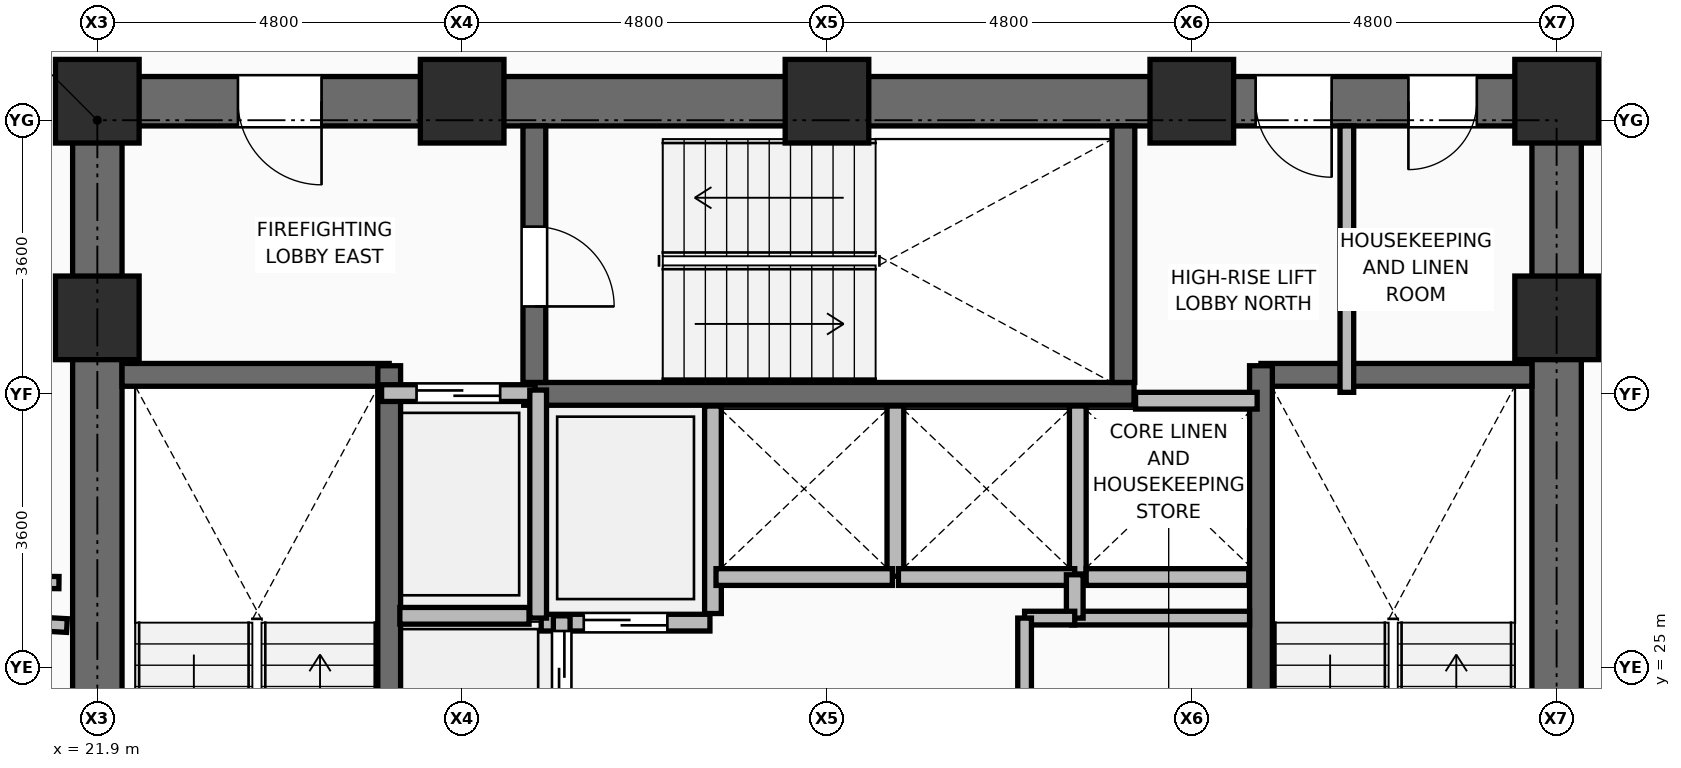
"""IFC4 building model, lengths in metres.
Left out: names, types, materials, properties, quantities, classifications, styles, units other than length and angle.
Written with IfcOpenShell. Run it as: python <this file> out.ifc"""

import sys

from ifc_helpers import new_model, si_unit, direction, frame, frame_2d, origin, origin_2d, place, context, subcontext, project, spatial, rectangle, extrude, element, fill, save


model = new_model("IFC4")
c1 = context("Model", 3, precision=1e-05, world=origin(), true_north=direction((0.0, 1.0)))
c2 = subcontext(c1, "Body", "Model", "MODEL_VIEW")
j1 = project(units=[si_unit("LENGTHUNIT", "METRE"), si_unit("PLANEANGLEUNIT", "RADIAN")], contexts=[c1])
p1 = place(None, origin())
s1 = spatial("IfcSite", under=j1, at=p1, CompositionType="ELEMENT")
p2 = place(p1, origin())
s2 = spatial("IfcBuilding", under=s1, at=p2, CompositionType="ELEMENT")
p3 = place(p2, frame((0.0, 0.0, 57.0)))
s3 = spatial("IfcBuildingStorey", under=s2, at=p3, CompositionType="ELEMENT", Elevation=57.0)
for number, where, z_axis, x_axis in (
    (1, (21.9, 29.6, 0.0), (0.0, 0.0, 1.0), (1.0, 0.0, 0.0)),
    (2, (41.1, 29.6, 0.0), (0.0, 0.0, 1.0), (1.0, 0.0, 0.0)),
    (3, (21.9, 32.45, 0.0), (0.0, 0.0, 1.0), (1.0, 0.0, 0.0)),
    (4, (26.7, 32.45, 0.0), (0.0, 0.0, 1.0), (1.0, 0.0, 0.0)),
    (5, (31.5, 32.45, 0.0), (0.0, 0.0, 1.0), (1.0, 0.0, 0.0)),
    (6, (36.3, 32.45, 0.0), (0.0, 0.0, 1.0), (1.0, 0.0, 0.0)),
    (7, (41.1, 32.45, 0.0), (0.0, 0.0, 1.0), (1.0, 0.0, 0.0)),
):
    element("IfcColumn", number, at=place(p3, frame(where, z_axis=z_axis, x_axis=x_axis)), inside=s3, PredefinedType="COLUMN", context=c2, shape_type="SweptSolid", body=[
        extrude(rectangle(XDim=1.1, YDim=1.1, at=origin_2d()), origin(), (0.0, 0.0, 1.0), 3.75),
    ])
p4 = place(p3, frame((30.0, 25.71, 0.0), z_axis=(0.0, 0.0, 1.0), x_axis=(0.0, 1.0, 0.0)))
e8 = element("IfcWall", 8, at=p4, inside=s3, PredefinedType="PARTITIONING", context=c2, shape_type="SweptSolid", body=[
    extrude(rectangle(XDim=2.73, YDim=0.22, at=frame_2d((1.365, 0.0))), origin(), (0.0, 0.0, 1.0), 3.545),
])
p5 = place(p3, frame((32.4, 26.2, 0.0), z_axis=(0.0, 0.0, 1.0), x_axis=(0.0, 1.0, 0.0)))
e9 = element("IfcWall", 9, at=p5, inside=s3, PredefinedType="PARTITIONING", context=c2, shape_type="SweptSolid", body=[
    extrude(rectangle(XDim=2.24, YDim=0.22, at=frame_2d((1.12, 0.0))), origin(), (0.0, 0.0, 1.0), 3.545),
])
p6 = place(p3, frame((34.8, 26.23, 0.0), z_axis=(0.0, 0.0, 1.0), x_axis=(0.0, 1.0, 0.0)))
e10 = element("IfcWall", 10, at=p6, inside=s3, PredefinedType="PARTITIONING", context=c2, shape_type="SweptSolid", body=[
    extrude(rectangle(XDim=2.21, YDim=0.22, at=frame_2d((1.105, 0.0))), origin(), (0.0, 0.0, 1.0), 3.545),
])
p7 = place(p3, frame((34.91, 26.19, 0.0), z_axis=(0.0, 0.0, 1.0), x_axis=(1.0, 0.0, 0.0)))
e11 = element("IfcWall", 11, at=p7, inside=s3, PredefinedType="PARTITIONING", context=c2, shape_type="SweptSolid", body=[
    extrude(rectangle(XDim=2.14, YDim=0.22, at=frame_2d((1.07, 0.0))), origin(), (0.0, 0.0, 1.0), 3.545),
])
p8 = place(p3, frame((21.575, 32.45, 0.0), z_axis=(0.0, 0.0, 1.0), x_axis=(1.0, 0.0, 0.0)))
e12 = element("IfcWall", 12, at=p8, inside=s3, PredefinedType="SHEAR", context=c2, shape_type="SweptSolid", body=[
    extrude(rectangle(XDim=19.85, YDim=0.65, at=frame_2d((9.925, 0.0))), origin(), (0.0, 0.0, 1.0), 3.57),
])
p9 = place(p8, frame((2.175, 0.0, 0.0)))
e13 = element("IfcOpeningElement", 13, at=p9, cuts=e12, PredefinedType="OPENING", context=c2, shape_type="SweptSolid", body=[
    extrude(rectangle(XDim=1.1, YDim=2.1, at=frame_2d((0.55, 1.05))), frame((0.0, 0.335, 0.0), z_axis=(0.0, -1.0, 0.0), x_axis=(1.0, 0.0, 0.0)), (0.0, 0.0, 1.0), 0.67),
])
p10 = place(p8, frame((15.565, 0.0, 0.0)))
e14 = element("IfcOpeningElement", 14, at=p10, cuts=e12, PredefinedType="OPENING", context=c2, shape_type="SweptSolid", body=[
    extrude(rectangle(XDim=1.0, YDim=2.1, at=frame_2d((0.5, 1.05))), frame((0.0, 0.335, 0.0), z_axis=(0.0, -1.0, 0.0), x_axis=(1.0, 0.0, 0.0)), (0.0, 0.0, 1.0), 0.67),
])
p11 = place(p8, frame((17.575, 0.0, 0.0)))
e15 = element("IfcOpeningElement", 15, at=p11, cuts=e12, PredefinedType="OPENING", context=c2, shape_type="SweptSolid", body=[
    extrude(rectangle(XDim=0.9, YDim=2.1, at=frame_2d((0.45, 1.05))), frame((0.0, 0.335, 0.0), z_axis=(0.0, -1.0, 0.0), x_axis=(1.0, 0.0, 0.0)), (0.0, 0.0, 1.0), 0.67),
])
p12 = place(p3, frame((21.9, 18.125, 0.0), z_axis=(0.0, 0.0, 1.0), x_axis=(0.0, 1.0, 0.0)))
e16 = element("IfcWall", 16, at=p12, inside=s3, PredefinedType="SHEAR", context=c2, shape_type="SweptSolid", body=[
    extrude(rectangle(XDim=14.0, YDim=0.65, at=frame_2d((7.0, 0.0))), origin(), (0.0, 0.0, 1.0), 3.57),
])
p13 = place(p3, frame((41.1, 18.125, 0.0), z_axis=(0.0, 0.0, 1.0), x_axis=(0.0, 1.0, 0.0)))
e17 = element("IfcWall", 17, at=p13, inside=s3, PredefinedType="SHEAR", context=c2, shape_type="SweptSolid", body=[
    extrude(rectangle(XDim=14.0, YDim=0.65, at=frame_2d((7.0, 0.0))), origin(), (0.0, 0.0, 1.0), 3.57),
])
p14 = place(p13, frame((3.335, 0.0, 0.0)))
e18 = element("IfcOpeningElement", 18, at=p14, cuts=e17, PredefinedType="OPENING", context=c2, shape_type="SweptSolid", body=[
    extrude(rectangle(XDim=1.05, YDim=2.1, at=frame_2d((0.525, 1.05))), frame((0.0, 0.335, 0.0), z_axis=(0.0, -1.0, 0.0), x_axis=(1.0, 0.0, 0.0)), (0.0, 0.0, 1.0), 0.67),
])
p15 = place(p3, frame((22.225, 28.85, 0.0), z_axis=(0.0, 0.0, 1.0), x_axis=(1.0, 0.0, 0.0)))
e19 = element("IfcWall", 19, at=p15, inside=s3, PredefinedType="SHEAR", context=c2, shape_type="SweptSolid", body=[
    extrude(rectangle(XDim=3.515, YDim=0.3, at=frame_2d((1.757, 0.0))), origin(), (0.0, 0.0, 1.0), 3.57),
])
p16 = place(p3, frame((25.74, 20.98, 0.0), z_axis=(0.0, 0.0, 1.0), x_axis=(0.0, 1.0, 0.0)))
e20 = element("IfcWall", 20, at=p16, inside=s3, PredefinedType="SHEAR", context=c2, shape_type="SweptSolid", body=[
    extrude(rectangle(XDim=7.99, YDim=0.3, at=frame_2d((3.995, 0.0))), origin(), (0.0, 0.0, 1.0), 3.57),
])
p17 = place(p3, frame((37.21, 28.85, 0.0), z_axis=(0.0, 0.0, 1.0), x_axis=(1.0, 0.0, 0.0)))
e21 = element("IfcWall", 21, at=p17, inside=s3, PredefinedType="SHEAR", context=c2, shape_type="SweptSolid", body=[
    extrude(rectangle(XDim=3.565, YDim=0.3, at=frame_2d((1.782, 0.0))), origin(), (0.0, 0.0, 1.0), 3.57),
])
p18 = place(p3, frame((37.21, 20.98, 0.0), z_axis=(0.0, 0.0, 1.0), x_axis=(0.0, 1.0, 0.0)))
e22 = element("IfcWall", 22, at=p18, inside=s3, PredefinedType="SHEAR", context=c2, shape_type="SweptSolid", body=[
    extrude(rectangle(XDim=7.99, YDim=0.3, at=frame_2d((3.995, 0.0))), origin(), (0.0, 0.0, 1.0), 3.57),
])
p19 = place(p3, frame((27.51, 28.6, 0.0), z_axis=(0.0, 0.0, 1.0), x_axis=(1.0, 0.0, 0.0)))
e23 = element("IfcWall", 23, at=p19, inside=s3, PredefinedType="SHEAR", context=c2, shape_type="SweptSolid", body=[
    extrude(rectangle(XDim=8.03, YDim=0.3, at=frame_2d((4.015, 0.0))), origin(), (0.0, 0.0, 1.0), 3.57),
])
p20 = place(p3, frame((27.65, 28.75, 0.0), z_axis=(0.0, 0.0, 1.0), x_axis=(0.0, 1.0, 0.0)))
e24 = element("IfcWall", 24, at=p20, inside=s3, PredefinedType="SHEAR", context=c2, shape_type="SweptSolid", body=[
    extrude(rectangle(XDim=3.375, YDim=0.3, at=frame_2d((1.688, 0.0))), origin(), (0.0, 0.0, 1.0), 3.57),
])
p21 = place(p20, frame((1.0, 0.0, 0.0)))
e25 = element("IfcOpeningElement", 25, at=p21, cuts=e24, PredefinedType="OPENING", context=c2, shape_type="SweptSolid", body=[
    extrude(rectangle(XDim=1.05, YDim=2.1, at=frame_2d((0.525, 1.05))), frame((0.0, 0.16, 0.0), z_axis=(0.0, -1.0, 0.0), x_axis=(1.0, 0.0, 0.0)), (0.0, 0.0, 1.0), 0.32),
])
p22 = place(p3, frame((35.4, 28.75, 0.0), z_axis=(0.0, 0.0, 1.0), x_axis=(0.0, 1.0, 0.0)))
e26 = element("IfcWall", 26, at=p22, inside=s3, PredefinedType="SHEAR", context=c2, shape_type="SweptSolid", body=[
    extrude(rectangle(XDim=3.375, YDim=0.3, at=frame_2d((1.688, 0.0))), origin(), (0.0, 0.0, 1.0), 3.57),
])
p23 = place(p3, frame((25.64, 28.61, 0.0), z_axis=(0.0, 0.0, 1.0), x_axis=(1.0, 0.0, 0.0)))
e27 = element("IfcWall", 27, at=p23, inside=s3, PredefinedType="PARTITIONING", context=c2, shape_type="SweptSolid", body=[
    extrude(rectangle(XDim=2.02, YDim=0.22, at=frame_2d((1.01, 0.0))), origin(), (0.0, 0.0, 1.0), 3.55),
])
p24 = place(p23, frame((0.46, 0.0, 0.0)))
e28 = element("IfcOpeningElement", 28, at=p24, cuts=e27, PredefinedType="OPENING", context=c2, shape_type="SweptSolid", body=[
    extrude(rectangle(XDim=1.1, YDim=2.2, at=frame_2d((0.55, 1.1))), frame((0.0, 0.12, 0.0), z_axis=(0.0, -1.0, 0.0), x_axis=(1.0, 0.0, 0.0)), (0.0, 0.0, 1.0), 0.24),
])
p25 = place(p3, frame((27.74, 25.59, 0.0), z_axis=(0.0, 0.0, 1.0), x_axis=(1.0, 0.0, 0.0)))
e29 = element("IfcWall", 29, at=p25, inside=s3, PredefinedType="PARTITIONING", context=c2, shape_type="SweptSolid", body=[
    extrude(rectangle(XDim=2.22, YDim=0.22, at=frame_2d((1.11, 0.0))), origin(), (0.0, 0.0, 1.0), 3.55),
])
p26 = place(p25, frame((0.56, 0.0, 0.0)))
e30 = element("IfcOpeningElement", 30, at=p26, cuts=e29, PredefinedType="OPENING", context=c2, shape_type="SweptSolid", body=[
    extrude(rectangle(XDim=1.1, YDim=2.2, at=frame_2d((0.55, 1.1))), frame((0.0, 0.12, 0.0), z_axis=(0.0, -1.0, 0.0), x_axis=(1.0, 0.0, 0.0)), (0.0, 0.0, 1.0), 0.24),
])
for number, where, z_axis, x_axis in (
    (31, (30.04, 26.19, 0.0), (0.0, 0.0, 1.0), (1.0, 0.0, 0.0)),
    (32, (32.44, 26.19, 0.0), (0.0, 0.0, 1.0), (1.0, 0.0, 0.0)),
):
    element("IfcWall", number, at=place(p3, frame(where, z_axis=z_axis, x_axis=x_axis)), inside=s3, PredefinedType="PARTITIONING", context=c2, shape_type="SweptSolid", body=[
        extrude(rectangle(XDim=2.32, YDim=0.22, at=frame_2d((1.16, 0.0))), origin(), (0.0, 0.0, 1.0), 3.55),
    ])
p27 = place(p3, frame((35.56, 28.51, 0.0), z_axis=(0.0, 0.0, 1.0), x_axis=(1.0, 0.0, 0.0)))
e33 = element("IfcWall", 33, at=p27, inside=s3, PredefinedType="PARTITIONING", context=c2, shape_type="SweptSolid", body=[
    extrude(rectangle(XDim=1.6, YDim=0.22, at=frame_2d((0.8, 0.0))), origin(), (0.0, 0.0, 1.0), 3.55),
])
p28 = place(p3, frame((28.01, 24.18, 0.0), z_axis=(0.0, 0.0, 1.0), x_axis=(0.0, 1.0, 0.0)))
e34 = element("IfcWall", 34, at=p28, inside=s3, PredefinedType="PARTITIONING", context=c2, shape_type="SweptSolid", body=[
    extrude(rectangle(XDim=1.5, YDim=0.22, at=frame_2d((0.75, 0.0))), origin(), (0.0, 0.0, 1.0), 3.55),
])
p29 = place(p28, frame((0.2, 0.0, 0.0)))
e35 = element("IfcOpeningElement", 35, at=p29, cuts=e34, PredefinedType="OPENING", context=c2, shape_type="SweptSolid", body=[
    extrude(rectangle(XDim=1.1, YDim=2.2, at=frame_2d((0.55, 1.1))), frame((0.0, 0.12, 0.0), z_axis=(0.0, -1.0, 0.0), x_axis=(1.0, 0.0, 0.0)), (0.0, 0.0, 1.0), 0.24),
])
p30 = place(p3, frame((27.7, 25.65, 0.0), z_axis=(0.0, 0.0, 1.0), x_axis=(0.0, 1.0, 0.0)))
e36 = element("IfcWall", 36, at=p30, inside=s3, PredefinedType="PARTITIONING", context=c2, shape_type="SweptSolid", body=[
    extrude(rectangle(XDim=3.0, YDim=0.22, at=frame_2d((1.5, 0.0))), origin(), (0.0, 0.0, 1.0), 3.55),
])
p31 = place(p3, frame((25.88, 25.68, 0.0), z_axis=(0.0, 0.0, 1.0), x_axis=(1.0, 0.0, 0.0)))
e37 = element("IfcWall", 37, at=p31, inside=s3, PredefinedType="PARTITIONING", context=c2, shape_type="SweptSolid", body=[
    extrude(rectangle(XDim=1.7, YDim=0.22, at=frame_2d((0.85, 0.0))), origin(), (0.0, 0.0, 1.0), 3.55),
])
p32 = place(p3, frame((34.72, 25.65, 0.0), z_axis=(0.0, 0.0, 1.0), x_axis=(1.0, 0.0, 0.0)))
e38 = element("IfcWall", 38, at=p32, inside=s3, PredefinedType="PARTITIONING", context=c2, shape_type="SweptSolid", body=[
    extrude(rectangle(XDim=2.34, YDim=0.18, at=frame_2d((1.17, 0.0))), origin(), (0.0, 0.0, 1.0), 3.55),
])
p33 = place(p3, frame((34.76, 25.65, 0.0), z_axis=(0.0, 0.0, 1.0), x_axis=(0.0, 1.0, 0.0)))
e39 = element("IfcWall", 39, at=p33, inside=s3, PredefinedType="PARTITIONING", context=c2, shape_type="SweptSolid", body=[
    extrude(rectangle(XDim=0.57, YDim=0.22, at=frame_2d((0.285, 0.0))), origin(), (0.0, 0.0, 1.0), 3.55),
])
p34 = place(p3, frame((34.1, 25.65, 0.0), z_axis=(0.0, 0.0, 1.0), x_axis=(1.0, 0.0, 0.0)))
e40 = element("IfcWall", 40, at=p34, inside=s3, PredefinedType="PARTITIONING", context=c2, shape_type="SweptSolid", body=[
    extrude(rectangle(XDim=0.66, YDim=0.18, at=frame_2d((0.33, 0.0))), origin(), (0.0, 0.0, 1.0), 3.55),
])
p35 = place(p3, frame((34.1, 21.1, 0.0), z_axis=(0.0, 0.0, 1.0), x_axis=(0.0, 1.0, 0.0)))
e41 = element("IfcWall", 41, at=p35, inside=s3, PredefinedType="PARTITIONING", context=c2, shape_type="SweptSolid", body=[
    extrude(rectangle(XDim=4.55, YDim=0.18, at=frame_2d((2.275, 0.0))), origin(), (0.0, 0.0, 1.0), 3.55),
])
p36 = place(p35, frame((1.825, 0.0, 0.0)))
e42 = element("IfcOpeningElement", 42, at=p36, cuts=e41, PredefinedType="OPENING", context=c2, shape_type="SweptSolid", body=[
    extrude(rectangle(XDim=0.9, YDim=2.1, at=frame_2d((0.45, 1.05))), frame((0.0, 0.1, 0.0), z_axis=(0.0, -1.0, 0.0), x_axis=(1.0, 0.0, 0.0)), (0.0, 0.0, 1.0), 0.2),
])
p37 = place(p3, frame((38.34, 28.62, 0.0), z_axis=(0.0, 0.0, 1.0), x_axis=(0.0, 1.0, 0.0)))
e43 = element("IfcWall", 43, at=p37, inside=s3, PredefinedType="PARTITIONING", context=c2, shape_type="SweptSolid", body=[
    extrude(rectangle(XDim=3.505, YDim=0.18, at=frame_2d((1.752, 0.0))), origin(), (0.0, 0.0, 1.0), 3.55),
])
p38 = place(p3, frame((21.395, 26.117, 0.0), z_axis=(0.0, 0.0, 1.0), x_axis=(-0.999936661747, 0.011254887571, 0.0)))
e44 = element("IfcWall", 44, at=p38, inside=s3, PredefinedType="PARTITIONING", context=c2, shape_type="SweptSolid", body=[
    extrude(rectangle(XDim=2.234, YDim=0.16, at=frame_2d((1.117, 0.0))), origin(), (0.0, 0.0, 1.0), 3.55),
])
p39 = place(p3, frame((21.5, 25.552, 0.0), z_axis=(0.0, 0.0, 1.0), x_axis=(-0.998476368936, 0.055180981107, 0.0)))
e45 = element("IfcWall", 45, at=p39, inside=s3, PredefinedType="PARTITIONING", context=c2, shape_type="SweptSolid", body=[
    extrude(rectangle(XDim=17.777, YDim=0.18, at=frame_2d((8.889, 0.0))), origin(), (0.0, 0.0, 1.0), 2.595),
])
p40 = place(p21, frame((1.05, 0.0, 0.0), z_axis=(0.0, 0.0, 1.0), x_axis=(-1.0, 0.0, 0.0)))
e46 = element("IfcDoor", 46, at=p40, inside=s3, OperationType="SINGLE_SWING_RIGHT", PredefinedType="DOOR", context=c2, shape_type="SweptSolid", body=[
    extrude(rectangle(XDim=1.05, YDim=2.1, at=frame_2d((0.525, 1.05))), frame((0.0, 0.025, 0.0), z_axis=(0.0, -1.0, 0.0), x_axis=(1.0, 0.0, 0.0)), (0.0, 0.0, 1.0), 0.05),
])
fill(e25, e46)
p41 = place(p24, origin())
e47 = element("IfcDoor", 47, at=p41, inside=s3, OperationType="DOUBLE_DOOR_SLIDING", PredefinedType="DOOR", context=c2, shape_type="SweptSolid", body=[
    extrude(rectangle(XDim=1.1, YDim=2.2, at=frame_2d((0.55, 1.1))), frame((0.0, 0.025, 0.0), z_axis=(0.0, -1.0, 0.0), x_axis=(1.0, 0.0, 0.0)), (0.0, 0.0, 1.0), 0.05),
])
fill(e28, e47)
p42 = place(p26, frame((1.1, 0.0, 0.0), z_axis=(0.0, 0.0, 1.0), x_axis=(-1.0, 0.0, 0.0)))
e48 = element("IfcDoor", 48, at=p42, inside=s3, OperationType="DOUBLE_DOOR_SLIDING", PredefinedType="DOOR", context=c2, shape_type="SweptSolid", body=[
    extrude(rectangle(XDim=1.1, YDim=2.2, at=frame_2d((0.55, 1.1))), frame((0.0, 0.025, 0.0), z_axis=(0.0, -1.0, 0.0), x_axis=(1.0, 0.0, 0.0)), (0.0, 0.0, 1.0), 0.05),
])
fill(e30, e48)
p43 = place(p29, frame((1.1, 0.0, 0.0), z_axis=(0.0, 0.0, 1.0), x_axis=(-1.0, 0.0, 0.0)))
e49 = element("IfcDoor", 49, at=p43, inside=s3, OperationType="DOUBLE_DOOR_SLIDING", PredefinedType="DOOR", context=c2, shape_type="SweptSolid", body=[
    extrude(rectangle(XDim=1.1, YDim=2.2, at=frame_2d((0.55, 1.1))), frame((0.0, 0.025, 0.0), z_axis=(0.0, -1.0, 0.0), x_axis=(1.0, 0.0, 0.0)), (0.0, 0.0, 1.0), 0.05),
])
fill(e35, e49)
p44 = place(p9, frame((1.1, 0.0, 0.0), z_axis=(0.0, 0.0, 1.0), x_axis=(-1.0, 0.0, 0.0)))
e50 = element("IfcDoor", 50, at=p44, inside=s3, OperationType="SINGLE_SWING_LEFT", PredefinedType="DOOR", context=c2, shape_type="SweptSolid", body=[
    extrude(rectangle(XDim=1.1, YDim=2.1, at=frame_2d((0.55, 1.05))), frame((0.0, 0.025, 0.0), z_axis=(0.0, -1.0, 0.0), x_axis=(1.0, 0.0, 0.0)), (0.0, 0.0, 1.0), 0.05),
])
fill(e13, e50)
p45 = place(p10, frame((1.0, 0.0, 0.0), z_axis=(0.0, 0.0, 1.0), x_axis=(-1.0, 0.0, 0.0)))
e51 = element("IfcDoor", 51, at=p45, inside=s3, OperationType="SINGLE_SWING_LEFT", PredefinedType="DOOR", context=c2, shape_type="SweptSolid", body=[
    extrude(rectangle(XDim=1.0, YDim=2.1, at=frame_2d((0.5, 1.05))), frame((0.0, 0.025, 0.0), z_axis=(0.0, -1.0, 0.0), x_axis=(1.0, 0.0, 0.0)), (0.0, 0.0, 1.0), 0.05),
])
fill(e14, e51)
p46 = place(p11, frame((0.9, 0.0, 0.0), z_axis=(0.0, 0.0, 1.0), x_axis=(-1.0, 0.0, 0.0)))
e52 = element("IfcDoor", 52, at=p46, inside=s3, OperationType="SINGLE_SWING_RIGHT", PredefinedType="DOOR", context=c2, shape_type="SweptSolid", body=[
    extrude(rectangle(XDim=0.9, YDim=2.1, at=frame_2d((0.45, 1.05))), frame((0.0, 0.025, 0.0), z_axis=(0.0, -1.0, 0.0), x_axis=(1.0, 0.0, 0.0)), (0.0, 0.0, 1.0), 0.05),
])
fill(e15, e52)
save(model, sys.argv[1])
